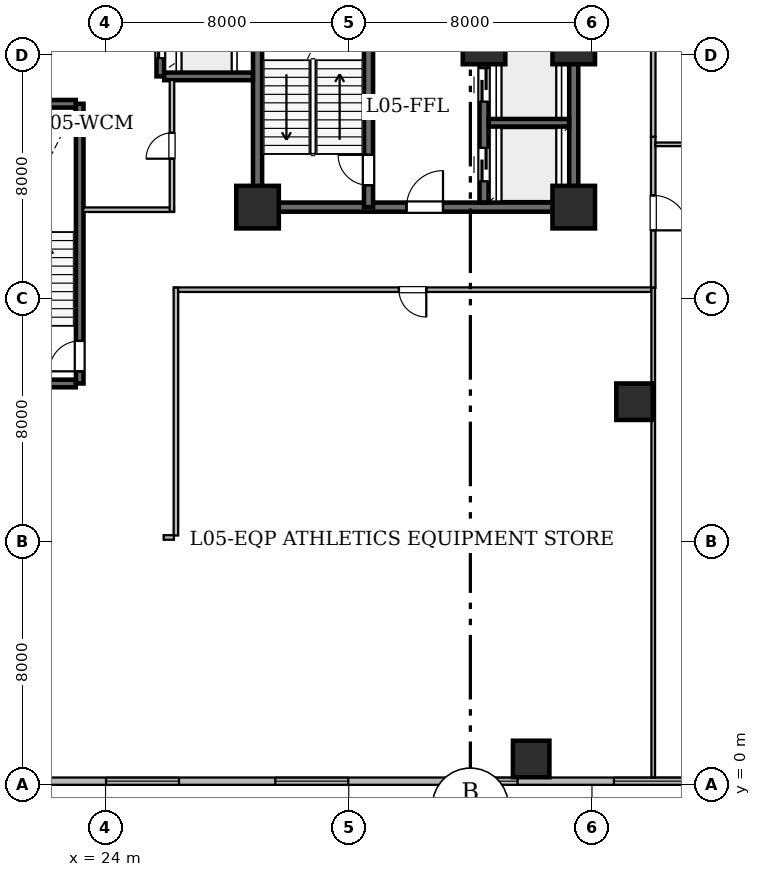
"""IFC4 building model, lengths in metres.
Left out: names, types, materials, properties, quantities, classifications, styles, units other than length and angle.
Written with IfcOpenShell. Run it as: python <this file> out.ifc"""

import sys

from ifc_helpers import new_model, si_unit, direction, frame, frame_2d, origin, origin_2d, place, context, subcontext, project, spatial, rectangle, hollow_rectangle, extrude, element, fill, save


model = new_model("IFC4")
c1 = context("Model", 3, precision=1e-05, world=origin(), true_north=direction((0.0, 1.0)))
c2 = subcontext(c1, "Body", "Model", "MODEL_VIEW")
j1 = project(units=[si_unit("LENGTHUNIT", "METRE"), si_unit("PLANEANGLEUNIT", "RADIAN")], contexts=[c1])
p1 = place(None, origin())
s1 = spatial("IfcSite", under=j1, at=p1, CompositionType="ELEMENT")
p2 = place(p1, origin())
s2 = spatial("IfcBuilding", under=s1, at=p2, CompositionType="ELEMENT")
p3 = place(p2, frame((0.0, 0.0, 24.6)))
s3 = spatial("IfcBuildingStorey", under=s2, at=p3, CompositionType="ELEMENT", Elevation=24.6)
for number, where, z_axis, x_axis in (
    (1, (29.0, 19.0, 0.0), (0.0, 0.0, 1.0), (1.0, 0.0, 0.0)),
    (2, (39.4, 19.0, 0.0), (0.0, 0.0, 1.0), (1.0, 0.0, 0.0)),
    (3, (36.45, 24.4, 0.0), (0.0, 0.0, 1.0), (1.0, 0.0, 0.0)),
    (4, (39.4, 24.4, 0.0), (0.0, 0.0, 1.0), (1.0, 0.0, 0.0)),
):
    element("IfcColumn", number, at=place(p3, frame(where, z_axis=z_axis, x_axis=x_axis)), inside=s3, PredefinedType="COLUMN", context=c2, shape_type="SweptSolid", body=[
        extrude(hollow_rectangle(XDim=1.4, YDim=1.4, WallThickness=0.07, at=origin_2d()), origin(), (0.0, 0.0, 1.0), 4.2),
    ])
for number, where, z_axis, x_axis in (
    (5, (38.0, 0.85, 0.0), (0.0, 0.0, 1.0), (1.0, 0.0, 0.0)),
    (6, (41.4, 12.6, 0.0), (0.0, 0.0, 1.0), (1.0, 0.0, 0.0)),
):
    element("IfcColumn", number, at=place(p3, frame(where, z_axis=z_axis, x_axis=x_axis)), inside=s3, PredefinedType="COLUMN", context=c2, shape_type="SweptSolid", body=[
        extrude(hollow_rectangle(XDim=1.2, YDim=1.2, WallThickness=0.06, at=origin_2d()), origin(), (0.0, 0.0, 1.0), 4.2),
    ])
p4 = place(p3, frame((50.275, 0.12, 0.0), z_axis=(0.0, 0.0, 1.0), x_axis=(-1.0, 0.0, 0.0)))
e7 = element("IfcWall", 7, at=p4, inside=s3, PredefinedType="STANDARD", context=c2, shape_type="SweptSolid", body=[
    extrude(rectangle(XDim=44.55, YDim=0.24, at=frame_2d((22.275, 0.0))), origin(), (0.0, 0.0, 1.0), 3.92),
])
p5 = place(p4, frame((1.584, 0.0, 0.9)))
e8 = element("IfcOpeningElement", 8, at=p5, cuts=e7, PredefinedType="OPENING", context=c2, shape_type="SweptSolid", body=[
    extrude(rectangle(XDim=2.4, YDim=1.7, at=frame_2d((1.2, 0.85))), frame((0.0, 0.13, 0.0), z_axis=(0.0, -1.0, 0.0), x_axis=(1.0, 0.0, 0.0)), (0.0, 0.0, 1.0), 0.26),
])
p6 = place(p4, frame((7.153, 0.0, 0.9)))
e9 = element("IfcOpeningElement", 9, at=p6, cuts=e7, PredefinedType="OPENING", context=c2, shape_type="SweptSolid", body=[
    extrude(rectangle(XDim=2.4, YDim=1.7, at=frame_2d((1.2, 0.85))), frame((0.0, 0.13, 0.0), z_axis=(0.0, -1.0, 0.0), x_axis=(1.0, 0.0, 0.0)), (0.0, 0.0, 1.0), 0.26),
])
p7 = place(p4, frame((12.722, 0.0, 0.9)))
e10 = element("IfcOpeningElement", 10, at=p7, cuts=e7, PredefinedType="OPENING", context=c2, shape_type="SweptSolid", body=[
    extrude(rectangle(XDim=2.4, YDim=1.7, at=frame_2d((1.2, 0.85))), frame((0.0, 0.13, 0.0), z_axis=(0.0, -1.0, 0.0), x_axis=(1.0, 0.0, 0.0)), (0.0, 0.0, 1.0), 0.26),
])
p8 = place(p4, frame((18.291, 0.0, 0.9)))
e11 = element("IfcOpeningElement", 11, at=p8, cuts=e7, PredefinedType="OPENING", context=c2, shape_type="SweptSolid", body=[
    extrude(rectangle(XDim=2.4, YDim=1.7, at=frame_2d((1.2, 0.85))), frame((0.0, 0.13, 0.0), z_axis=(0.0, -1.0, 0.0), x_axis=(1.0, 0.0, 0.0)), (0.0, 0.0, 1.0), 0.26),
])
p9 = place(p4, frame((23.859, 0.0, 0.9)))
e12 = element("IfcOpeningElement", 12, at=p9, cuts=e7, PredefinedType="OPENING", context=c2, shape_type="SweptSolid", body=[
    extrude(rectangle(XDim=2.4, YDim=1.7, at=frame_2d((1.2, 0.85))), frame((0.0, 0.13, 0.0), z_axis=(0.0, -1.0, 0.0), x_axis=(1.0, 0.0, 0.0)), (0.0, 0.0, 1.0), 0.26),
])
p10 = place(p4, frame((29.428, 0.0, 0.9)))
e13 = element("IfcOpeningElement", 13, at=p10, cuts=e7, PredefinedType="OPENING", context=c2, shape_type="SweptSolid", body=[
    extrude(rectangle(XDim=2.4, YDim=1.7, at=frame_2d((1.2, 0.85))), frame((0.0, 0.13, 0.0), z_axis=(0.0, -1.0, 0.0), x_axis=(1.0, 0.0, 0.0)), (0.0, 0.0, 1.0), 0.26),
])
p11 = place(p4, frame((34.997, 0.0, 0.9)))
e14 = element("IfcOpeningElement", 14, at=p11, cuts=e7, PredefinedType="OPENING", context=c2, shape_type="SweptSolid", body=[
    extrude(rectangle(XDim=2.4, YDim=1.7, at=frame_2d((1.2, 0.85))), frame((0.0, 0.13, 0.0), z_axis=(0.0, -1.0, 0.0), x_axis=(1.0, 0.0, 0.0)), (0.0, 0.0, 1.0), 0.26),
])
p12 = place(p4, frame((40.566, 0.0, 0.9)))
e15 = element("IfcOpeningElement", 15, at=p12, cuts=e7, PredefinedType="OPENING", context=c2, shape_type="SweptSolid", body=[
    extrude(rectangle(XDim=2.4, YDim=1.7, at=frame_2d((1.2, 0.85))), frame((0.0, 0.13, 0.0), z_axis=(0.0, -1.0, 0.0), x_axis=(1.0, 0.0, 0.0)), (0.0, 0.0, 1.0), 0.26),
])
p13 = place(p3, frame((29.0, 19.0, 0.0), z_axis=(0.0, 0.0, 1.0), x_axis=(0.0, 1.0, 0.0)))
e16 = element("IfcWall", 16, at=p13, inside=s3, PredefinedType="SHEAR", context=c2, shape_type="SweptSolid", body=[
    extrude(rectangle(XDim=9.0, YDim=0.3, at=frame_2d((4.5, 0.0))), origin(), (0.0, 0.0, 1.0), 3.92),
])
p14 = place(p3, frame((29.0, 19.0, 0.0), z_axis=(0.0, 0.0, 1.0), x_axis=(1.0, 0.0, 0.0)))
e17 = element("IfcWall", 17, at=p14, inside=s3, PredefinedType="SHEAR", context=c2, shape_type="SweptSolid", body=[
    extrude(rectangle(XDim=10.4, YDim=0.3, at=frame_2d((5.2, 0.0))), origin(), (0.0, 0.0, 1.0), 3.92),
])
p15 = place(p14, frame((4.9, 0.0, 0.0)))
e18 = element("IfcOpeningElement", 18, at=p15, cuts=e17, PredefinedType="OPENING", context=c2, shape_type="SweptSolid", body=[
    extrude(rectangle(XDim=1.2, YDim=2.15, at=frame_2d((0.6, 1.075))), frame((0.0, 0.16, 0.0), z_axis=(0.0, -1.0, 0.0), x_axis=(1.0, 0.0, 0.0)), (0.0, 0.0, 1.0), 0.32),
])
p16 = place(p3, frame((39.4, 19.0, 0.0), z_axis=(0.0, 0.0, 1.0), x_axis=(0.0, 1.0, 0.0)))
e19 = element("IfcWall", 19, at=p16, inside=s3, PredefinedType="SHEAR", context=c2, shape_type="SweptSolid", body=[
    extrude(rectangle(XDim=5.4, YDim=0.3, at=frame_2d((2.7, 0.0))), origin(), (0.0, 0.0, 1.0), 3.92),
])
p17 = place(p3, frame((32.65, 19.0, 0.0), z_axis=(0.0, 0.0, 1.0), x_axis=(0.0, 1.0, 0.0)))
e20 = element("IfcWall", 20, at=p17, inside=s3, PredefinedType="SHEAR", context=c2, shape_type="SweptSolid", body=[
    extrude(rectangle(XDim=9.0, YDim=0.3, at=frame_2d((4.5, 0.0))), origin(), (0.0, 0.0, 1.0), 3.92),
])
p18 = place(p17, frame((0.72, 0.0, 0.0)))
e21 = element("IfcOpeningElement", 21, at=p18, cuts=e20, PredefinedType="OPENING", context=c2, shape_type="SweptSolid", body=[
    extrude(rectangle(XDim=1.0, YDim=2.15, at=frame_2d((0.5, 1.075))), frame((0.0, 0.16, 0.0), z_axis=(0.0, -1.0, 0.0), x_axis=(1.0, 0.0, 0.0)), (0.0, 0.0, 1.0), 0.32),
])
p19 = place(p3, frame((36.45, 19.154, 0.0), z_axis=(0.0, 0.0, 1.0), x_axis=(0.0, 1.0, 0.0)))
e22 = element("IfcWall", 22, at=p19, inside=s3, PredefinedType="SHEAR", context=c2, shape_type="SweptSolid", body=[
    extrude(rectangle(XDim=4.546, YDim=0.3, at=frame_2d((2.273, 0.0))), origin(), (0.0, 0.0, 1.0), 3.92),
])
p20 = place(p19, frame((0.696, 0.0, 0.0)))
e23 = element("IfcOpeningElement", 23, at=p20, cuts=e22, PredefinedType="OPENING", context=c2, shape_type="SweptSolid", body=[
    extrude(rectangle(XDim=1.1, YDim=2.15, at=frame_2d((0.55, 1.075))), frame((0.0, 0.16, 0.0), z_axis=(0.0, -1.0, 0.0), x_axis=(1.0, 0.0, 0.0)), (0.0, 0.0, 1.0), 0.32),
])
p21 = place(p19, frame((3.316, 0.0, 0.0)))
e24 = element("IfcOpeningElement", 24, at=p21, cuts=e22, PredefinedType="OPENING", context=c2, shape_type="SweptSolid", body=[
    extrude(rectangle(XDim=1.1, YDim=2.15, at=frame_2d((0.55, 1.075))), frame((0.0, 0.16, 0.0), z_axis=(0.0, -1.0, 0.0), x_axis=(1.0, 0.0, 0.0)), (0.0, 0.0, 1.0), 0.32),
])
p22 = place(p3, frame((36.604, 21.775, 0.0), z_axis=(0.0, 0.0, 1.0), x_axis=(1.0, 0.0, 0.0)))
e25 = element("IfcWall", 25, at=p22, inside=s3, PredefinedType="SHEAR", context=c2, shape_type="SweptSolid", body=[
    extrude(rectangle(XDim=2.642, YDim=0.25, at=frame_2d((1.321, 0.0))), origin(), (0.0, 0.0, 1.0), 3.92),
])
p23 = place(p3, frame((23.15, 13.2, 0.0), z_axis=(0.0, 0.0, 1.0), x_axis=(0.0, 1.0, 0.0)))
e26 = element("IfcWall", 26, at=p23, inside=s3, PredefinedType="SHEAR", context=c2, shape_type="SweptSolid", body=[
    extrude(rectangle(XDim=9.2, YDim=0.25, at=frame_2d((4.6, 0.0))), origin(), (0.0, 0.0, 1.0), 3.92),
])
p24 = place(p23, frame((0.4, 0.0, 0.0)))
e27 = element("IfcOpeningElement", 27, at=p24, cuts=e26, PredefinedType="OPENING", context=c2, shape_type="SweptSolid", body=[
    extrude(rectangle(XDim=1.0, YDim=2.15, at=frame_2d((0.5, 1.075))), frame((0.0, 0.135, 0.0), z_axis=(0.0, -1.0, 0.0), x_axis=(1.0, 0.0, 0.0)), (0.0, 0.0, 1.0), 0.27),
])
for number, where, z_axis, x_axis in (
    (28, (19.329, 13.2, 0.0), (0.0, 0.0, 1.0), (1.0, 0.0, 0.0)),
    (29, (19.329, 22.4, 0.0), (0.0, 0.0, 1.0), (1.0, 0.0, 0.0)),
):
    element("IfcWall", number, at=place(p3, frame(where, z_axis=z_axis, x_axis=x_axis)), inside=s3, PredefinedType="SHEAR", context=c2, shape_type="SweptSolid", body=[
        extrude(rectangle(XDim=3.692, YDim=0.25, at=frame_2d((1.846, 0.0))), origin(), (0.0, 0.0, 1.0), 3.92),
    ])
p25 = place(p3, frame((25.8, 23.3, 0.0), z_axis=(0.0, 0.0, 1.0), x_axis=(0.0, 1.0, 0.0)))
e30 = element("IfcWall", 30, at=p25, inside=s3, PredefinedType="SHEAR", context=c2, shape_type="SweptSolid", body=[
    extrude(rectangle(XDim=4.55, YDim=0.25, at=frame_2d((2.275, 0.0))), origin(), (0.0, 0.0, 1.0), 3.92),
])
p26 = place(p25, frame((0.6, 0.0, 0.0)))
e31 = element("IfcOpeningElement", 31, at=p26, cuts=e30, PredefinedType="OPENING", context=c2, shape_type="SweptSolid", body=[
    extrude(rectangle(XDim=1.1, YDim=2.15, at=frame_2d((0.55, 1.075))), frame((0.0, 0.135, 0.0), z_axis=(0.0, -1.0, 0.0), x_axis=(1.0, 0.0, 0.0)), (0.0, 0.0, 1.0), 0.27),
])
p27 = place(p25, frame((2.85, 0.0, 0.0)))
e32 = element("IfcOpeningElement", 32, at=p27, cuts=e30, PredefinedType="OPENING", context=c2, shape_type="SweptSolid", body=[
    extrude(rectangle(XDim=1.1, YDim=2.15, at=frame_2d((0.55, 1.075))), frame((0.0, 0.135, 0.0), z_axis=(0.0, -1.0, 0.0), x_axis=(1.0, 0.0, 0.0)), (0.0, 0.0, 1.0), 0.27),
])
p28 = place(p3, frame((25.929, 23.3, 0.0), z_axis=(0.0, 0.0, 1.0), x_axis=(1.0, 0.0, 0.0)))
e33 = element("IfcWall", 33, at=p28, inside=s3, PredefinedType="SHEAR", context=c2, shape_type="SweptSolid", body=[
    extrude(rectangle(XDim=2.917, YDim=0.25, at=frame_2d((1.458, 0.0))), origin(), (0.0, 0.0, 1.0), 3.92),
])
p29 = place(p3, frame((23.267, 18.915, 0.0), z_axis=(0.0, 0.0, 1.0), x_axis=(1.0, 0.0, 0.0)))
e34 = element("IfcWall", 34, at=p29, inside=s3, PredefinedType="STANDARD", context=c2, shape_type="SweptSolid", body=[
    extrude(rectangle(XDim=2.983, YDim=0.15, at=frame_2d((1.491, 0.0))), origin(), (0.0, 0.0, 1.0), 3.92),
])
p30 = place(p3, frame((26.185, 18.852, 0.0), z_axis=(0.0, 0.0, 1.0), x_axis=(0.0, 1.0, 0.0)))
e35 = element("IfcWall", 35, at=p30, inside=s3, PredefinedType="STANDARD", context=c2, shape_type="SweptSolid", body=[
    extrude(rectangle(XDim=4.331, YDim=0.15, at=frame_2d((2.166, 0.0))), origin(), (0.0, 0.0, 1.0), 3.92),
])
p31 = place(p30, frame((1.741, 0.0, 0.0)))
e36 = element("IfcOpeningElement", 36, at=p31, cuts=e35, PredefinedType="OPENING", context=c2, shape_type="SweptSolid", body=[
    extrude(rectangle(XDim=0.85, YDim=2.1, at=frame_2d((0.425, 1.05))), frame((0.0, 0.085, 0.0), z_axis=(0.0, -1.0, 0.0), x_axis=(1.0, 0.0, 0.0)), (0.0, 0.0, 1.0), 0.17),
])
p32 = place(p3, frame((42.015, 21.314, 0.0), z_axis=(0.0, 0.0, 1.0), x_axis=(0.0, -1.0, 0.0)))
e37 = element("IfcWall", 37, at=p32, inside=s3, PredefinedType="STANDARD", context=c2, shape_type="SweptSolid", body=[
    extrude(rectangle(XDim=4.964, YDim=0.15, at=frame_2d((2.482, 0.0))), origin(), (0.0, 0.0, 1.0), 3.055),
])
p33 = place(p32, frame((1.928, 0.0, 0.0)))
e38 = element("IfcOpeningElement", 38, at=p33, cuts=e37, PredefinedType="OPENING", context=c2, shape_type="SweptSolid", body=[
    extrude(rectangle(XDim=1.15, YDim=2.2, at=frame_2d((0.575, 1.1))), frame((0.0, 0.085, 0.0), z_axis=(0.0, -1.0, 0.0), x_axis=(1.0, 0.0, 0.0)), (0.0, 0.0, 1.0), 0.17),
])
p34 = place(p3, frame((42.015, 37.814, 0.0), z_axis=(0.0, 0.0, 1.0), x_axis=(0.0, -1.0, 0.0)))
e39 = element("IfcWall", 39, at=p34, inside=s3, PredefinedType="STANDARD", context=c2, shape_type="SweptSolid", body=[
    extrude(rectangle(XDim=16.5, YDim=0.15, at=frame_2d((8.25, 0.0))), origin(), (0.0, 0.0, 1.0), 3.055),
])
p35 = place(p34, frame((7.696, 0.0, 0.0)))
e40 = element("IfcOpeningElement", 40, at=p35, cuts=e39, PredefinedType="OPENING", context=c2, shape_type="SweptSolid", body=[
    extrude(rectangle(XDim=1.15, YDim=2.2, at=frame_2d((0.575, 1.1))), frame((0.0, 0.085, 0.0), z_axis=(0.0, -1.0, 0.0), x_axis=(1.0, 0.0, 0.0)), (0.0, 0.0, 1.0), 0.17),
])
p36 = place(p3, frame((41.95, 16.285, 0.0), z_axis=(0.0, 0.0, 1.0), x_axis=(-1.0, 0.0, 0.0)))
e41 = element("IfcWall", 41, at=p36, inside=s3, PredefinedType="STANDARD", context=c2, shape_type="SweptSolid", body=[
    extrude(rectangle(XDim=15.7, YDim=0.15, at=frame_2d((7.85, 0.0))), origin(), (0.0, 0.0, 1.0), 3.055),
])
p37 = place(p36, frame((7.4, 0.0, 0.0)))
e42 = element("IfcOpeningElement", 42, at=p37, cuts=e41, PredefinedType="OPENING", context=c2, shape_type="SweptSolid", body=[
    extrude(rectangle(XDim=0.9, YDim=2.1, at=frame_2d((0.45, 1.05))), frame((0.0, 0.085, 0.0), z_axis=(0.0, -1.0, 0.0), x_axis=(1.0, 0.0, 0.0)), (0.0, 0.0, 1.0), 0.17),
])
p38 = place(p3, frame((26.315, 16.35, 0.0), z_axis=(0.0, 0.0, 1.0), x_axis=(0.0, -1.0, 0.0)))
e43 = element("IfcWall", 43, at=p38, inside=s3, PredefinedType="STANDARD", context=c2, shape_type="SweptSolid", body=[
    extrude(rectangle(XDim=8.15, YDim=0.15, at=frame_2d((4.075, 0.0))), origin(), (0.0, 0.0, 1.0), 3.055),
])
p39 = place(p3, frame((26.25, 8.135, 0.0), z_axis=(0.0, 0.0, 1.0), x_axis=(-1.0, 0.0, 0.0)))
e44 = element("IfcWall", 44, at=p39, inside=s3, PredefinedType="STANDARD", context=c2, shape_type="SweptSolid", body=[
    extrude(rectangle(XDim=0.339, YDim=0.15, at=frame_2d((0.169, 0.0))), origin(), (0.0, 0.0, 1.0), 3.92),
])
p40 = place(p3, frame((42.082, 21.065, 0.0), z_axis=(0.0, 0.0, 1.0), x_axis=(1.0, 0.0, 0.0)))
e45 = element("IfcWall", 45, at=p40, inside=s3, PredefinedType="PARTITIONING", context=c2, shape_type="SweptSolid", body=[
    extrude(rectangle(XDim=13.686, YDim=0.12, at=frame_2d((6.843, 0.0))), origin(), (0.0, 0.0, 1.0), 3.055),
])
p41 = place(p3, frame((42.015, 0.243, 0.0), z_axis=(0.0, 0.0, 1.0), x_axis=(0.0, 1.0, 0.0)))
e46 = element("IfcWall", 46, at=p41, inside=s3, PredefinedType="PARTITIONING", context=c2, shape_type="SweptSolid", body=[
    extrude(rectangle(XDim=16.107, YDim=0.12, at=frame_2d((8.054, 0.0))), origin(), (0.0, 0.0, 1.0), 3.055),
])
p42 = place(p6, origin())
e47 = element("IfcWindow", 47, at=p42, inside=s3, PartitioningType="SINGLE_PANEL", PredefinedType="WINDOW", context=c2, shape_type="SweptSolid", body=[
    extrude(rectangle(XDim=2.4, YDim=1.7, at=frame_2d((1.2, 0.85))), frame((0.0, 0.03, 0.0), z_axis=(0.0, -1.0, 0.0), x_axis=(1.0, 0.0, 0.0)), (0.0, 0.0, 1.0), 0.06),
])
fill(e9, e47)
p43 = place(p7, origin())
e48 = element("IfcWindow", 48, at=p43, inside=s3, PartitioningType="SINGLE_PANEL", PredefinedType="WINDOW", context=c2, shape_type="SweptSolid", body=[
    extrude(rectangle(XDim=2.4, YDim=1.7, at=frame_2d((1.2, 0.85))), frame((0.0, 0.03, 0.0), z_axis=(0.0, -1.0, 0.0), x_axis=(1.0, 0.0, 0.0)), (0.0, 0.0, 1.0), 0.06),
])
fill(e10, e48)
p44 = place(p8, origin())
e49 = element("IfcWindow", 49, at=p44, inside=s3, PartitioningType="SINGLE_PANEL", PredefinedType="WINDOW", context=c2, shape_type="SweptSolid", body=[
    extrude(rectangle(XDim=2.4, YDim=1.7, at=frame_2d((1.2, 0.85))), frame((0.0, 0.03, 0.0), z_axis=(0.0, -1.0, 0.0), x_axis=(1.0, 0.0, 0.0)), (0.0, 0.0, 1.0), 0.06),
])
fill(e11, e49)
p45 = place(p9, origin())
e50 = element("IfcWindow", 50, at=p45, inside=s3, PartitioningType="SINGLE_PANEL", PredefinedType="WINDOW", context=c2, shape_type="SweptSolid", body=[
    extrude(rectangle(XDim=2.4, YDim=1.7, at=frame_2d((1.2, 0.85))), frame((0.0, 0.03, 0.0), z_axis=(0.0, -1.0, 0.0), x_axis=(1.0, 0.0, 0.0)), (0.0, 0.0, 1.0), 0.06),
])
fill(e12, e50)
p46 = place(p18, origin())
e51 = element("IfcDoor", 51, at=p46, inside=s3, OperationType="SINGLE_SWING_RIGHT", PredefinedType="DOOR", context=c2, shape_type="SweptSolid", body=[
    extrude(rectangle(XDim=1.0, YDim=2.15, at=frame_2d((0.5, 1.075))), frame((0.0, 0.025, 0.0), z_axis=(0.0, -1.0, 0.0), x_axis=(1.0, 0.0, 0.0)), (0.0, 0.0, 1.0), 0.05),
])
fill(e21, e51)
p47 = place(p15, origin())
e52 = element("IfcDoor", 52, at=p47, inside=s3, OperationType="SINGLE_SWING_RIGHT", PredefinedType="DOOR", context=c2, shape_type="SweptSolid", body=[
    extrude(rectangle(XDim=1.2, YDim=2.15, at=frame_2d((0.6, 1.075))), frame((0.0, 0.025, 0.0), z_axis=(0.0, -1.0, 0.0), x_axis=(1.0, 0.0, 0.0)), (0.0, 0.0, 1.0), 0.05),
])
fill(e18, e52)
p48 = place(p20, origin())
e53 = element("IfcDoor", 53, at=p48, inside=s3, OperationType="SLIDING_TO_LEFT", PredefinedType="DOOR", context=c2, shape_type="SweptSolid", body=[
    extrude(rectangle(XDim=1.1, YDim=2.15, at=frame_2d((0.55, 1.075))), frame((0.0, 0.025, 0.0), z_axis=(0.0, -1.0, 0.0), x_axis=(1.0, 0.0, 0.0)), (0.0, 0.0, 1.0), 0.05),
])
fill(e23, e53)
p49 = place(p21, origin())
e54 = element("IfcDoor", 54, at=p49, inside=s3, OperationType="SLIDING_TO_LEFT", PredefinedType="DOOR", context=c2, shape_type="SweptSolid", body=[
    extrude(rectangle(XDim=1.1, YDim=2.15, at=frame_2d((0.55, 1.075))), frame((0.0, 0.025, 0.0), z_axis=(0.0, -1.0, 0.0), x_axis=(1.0, 0.0, 0.0)), (0.0, 0.0, 1.0), 0.05),
])
fill(e24, e54)
p50 = place(p24, origin())
e55 = element("IfcDoor", 55, at=p50, inside=s3, OperationType="SINGLE_SWING_LEFT", PredefinedType="DOOR", context=c2, shape_type="SweptSolid", body=[
    extrude(rectangle(XDim=1.0, YDim=2.15, at=frame_2d((0.5, 1.075))), frame((0.0, 0.025, 0.0), z_axis=(0.0, -1.0, 0.0), x_axis=(1.0, 0.0, 0.0)), (0.0, 0.0, 1.0), 0.05),
])
fill(e27, e55)
p51 = place(p26, origin())
e56 = element("IfcDoor", 56, at=p51, inside=s3, OperationType="SLIDING_TO_LEFT", PredefinedType="DOOR", context=c2, shape_type="SweptSolid", body=[
    extrude(rectangle(XDim=1.1, YDim=2.15, at=frame_2d((0.55, 1.075))), frame((0.0, 0.025, 0.0), z_axis=(0.0, -1.0, 0.0), x_axis=(1.0, 0.0, 0.0)), (0.0, 0.0, 1.0), 0.05),
])
fill(e31, e56)
p52 = place(p31, origin())
e57 = element("IfcDoor", 57, at=p52, inside=s3, OperationType="SINGLE_SWING_LEFT", PredefinedType="DOOR", context=c2, shape_type="SweptSolid", body=[
    extrude(rectangle(XDim=0.85, YDim=2.1, at=frame_2d((0.425, 1.05))), frame((0.0, 0.025, 0.0), z_axis=(0.0, -1.0, 0.0), x_axis=(1.0, 0.0, 0.0)), (0.0, 0.0, 1.0), 0.05),
])
fill(e36, e57)
p53 = place(p33, origin())
e58 = element("IfcDoor", 58, at=p53, inside=s3, OperationType="SINGLE_SWING_RIGHT", PredefinedType="DOOR", context=c2, shape_type="SweptSolid", body=[
    extrude(rectangle(XDim=1.15, YDim=2.2, at=frame_2d((0.575, 1.1))), frame((0.0, 0.025, 0.0), z_axis=(0.0, -1.0, 0.0), x_axis=(1.0, 0.0, 0.0)), (0.0, 0.0, 1.0), 0.05),
])
fill(e38, e58)
p54 = place(p37, origin())
e59 = element("IfcDoor", 59, at=p54, inside=s3, OperationType="SINGLE_SWING_LEFT", PredefinedType="DOOR", context=c2, shape_type="SweptSolid", body=[
    extrude(rectangle(XDim=0.9, YDim=2.1, at=frame_2d((0.45, 1.05))), frame((0.0, 0.025, 0.0), z_axis=(0.0, -1.0, 0.0), x_axis=(1.0, 0.0, 0.0)), (0.0, 0.0, 1.0), 0.05),
])
fill(e42, e59)
save(model, sys.argv[1])
